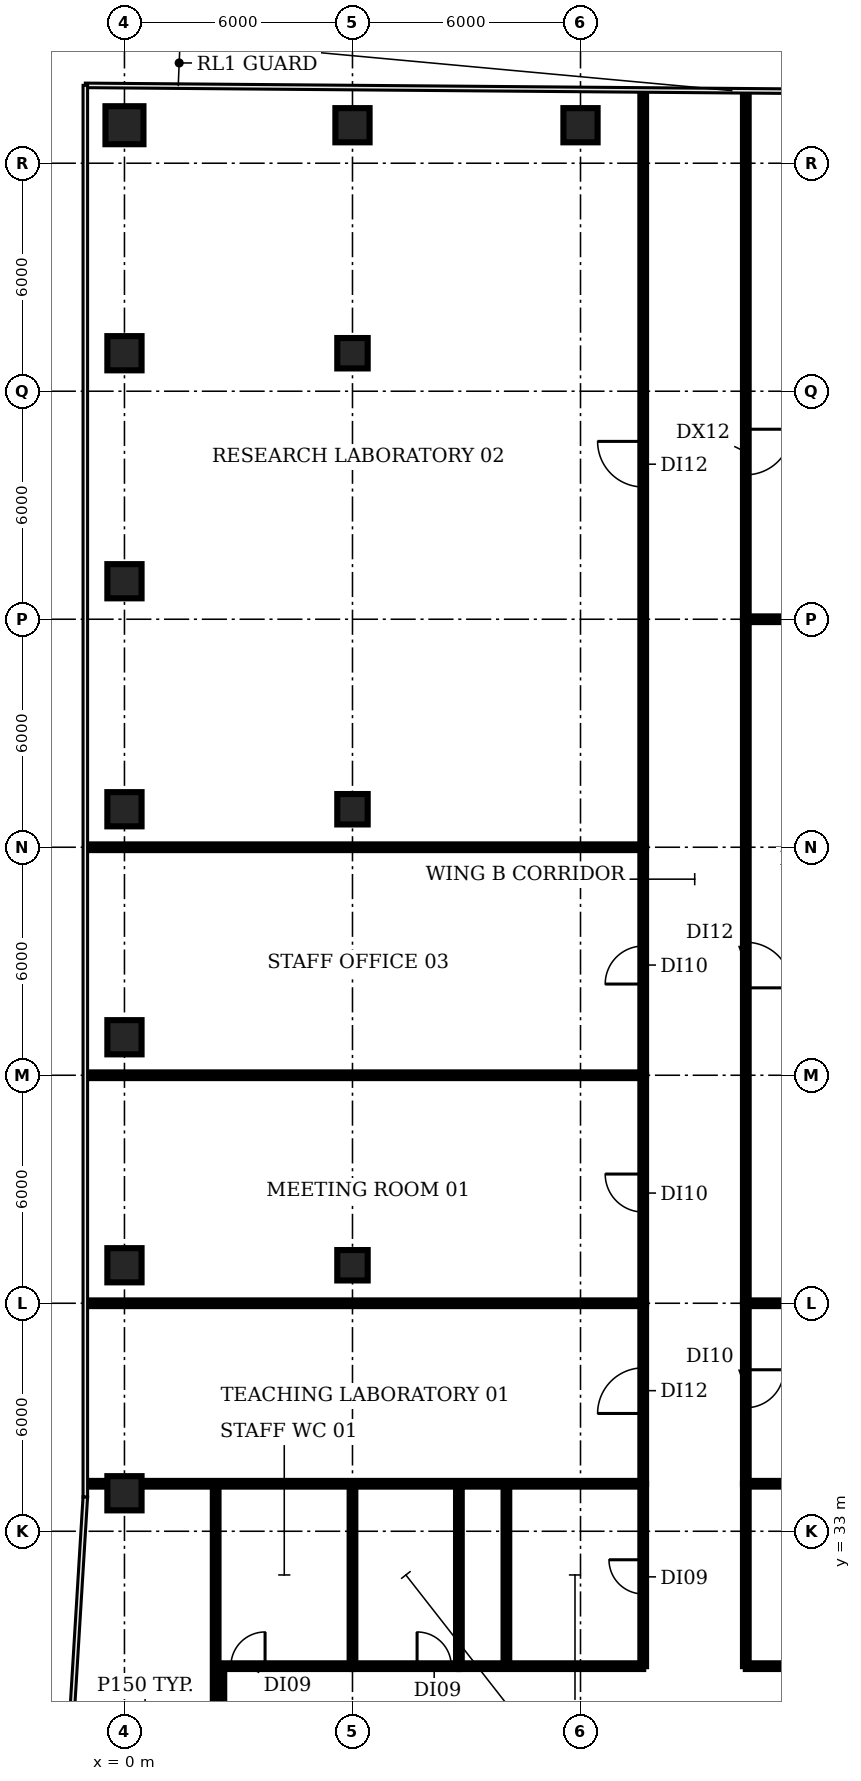
"""IFC4 building model, lengths in metres.
Left out: names, types, materials, properties, quantities, classifications, styles, units other than length and angle.
Written with IfcOpenShell. Run it as: python <this file> out.ifc"""

import sys

from ifc_helpers import new_model, si_unit, direction, frame, frame_2d, origin, origin_2d, place, context, subcontext, project, spatial, rectangle, circle, extrude, element, fill, save


model = new_model("IFC4")
c1 = context("Model", 3, precision=1e-05, world=origin(), true_north=direction((0.0, 1.0)))
c2 = subcontext(c1, "Body", "Model", "MODEL_VIEW")
j1 = project(units=[si_unit("LENGTHUNIT", "METRE"), si_unit("PLANEANGLEUNIT", "RADIAN")], contexts=[c1])
p1 = place(None, origin())
s1 = spatial("IfcSite", under=j1, at=p1, CompositionType="ELEMENT")
p2 = place(p1, origin())
s2 = spatial("IfcBuilding", under=s1, at=p2, CompositionType="ELEMENT")
p3 = place(p2, frame((0.0, 0.0, 125.6)))
s3 = spatial("IfcBuildingStorey", under=s2, at=p3, CompositionType="ELEMENT", Elevation=125.6)
for number, where, z_axis, x_axis in (
    (1, (0.0, 34.0, 0.0), (0.0, 0.0, 1.0), (1.0, 0.0, 0.0)),
    (2, (0.0, 40.0, 0.0), (0.0, 0.0, 1.0), (1.0, 0.0, 0.0)),
    (3, (0.0, 46.0, 0.0), (0.0, 0.0, 1.0), (1.0, 0.0, 0.0)),
    (4, (0.0, 52.0, 0.0), (0.0, 0.0, 1.0), (1.0, 0.0, 0.0)),
    (5, (0.0, 58.0, 0.0), (0.0, 0.0, 1.0), (1.0, 0.0, 0.0)),
    (6, (0.0, 64.0, 0.0), (0.0, 0.0, 1.0), (1.0, 0.0, 0.0)),
):
    element("IfcColumn", number, at=place(p3, frame(where, z_axis=z_axis, x_axis=x_axis)), inside=s3, PredefinedType="COLUMN", context=c2, shape_type="SweptSolid", body=[
        extrude(rectangle(XDim=0.9, YDim=0.9, at=origin_2d()), origin(), (0.0, 0.0, 1.0), 3.85),
    ])
p4 = place(p3, frame((0.0, 70.0, 0.0), z_axis=(0.0, 0.0, 1.0), x_axis=(1.0, 0.0, 0.0)))
e7 = element("IfcColumn", 7, at=p4, inside=s3, PredefinedType="COLUMN", context=c2, shape_type="SweptSolid", body=[
    extrude(circle(Radius=0.5, at=origin_2d()), origin(), (0.0, 0.0, 1.0), 3.85),
])
for number, where, z_axis, x_axis in (
    (8, (6.0, 40.0, 0.0), (0.0, 0.0, 1.0), (1.0, 0.0, 0.0)),
    (9, (6.0, 52.0, 0.0), (0.0, 0.0, 1.0), (1.0, 0.0, 0.0)),
    (10, (6.0, 64.0, 0.0), (0.0, 0.0, 1.0), (1.0, 0.0, 0.0)),
):
    element("IfcColumn", number, at=place(p3, frame(where, z_axis=z_axis, x_axis=x_axis)), inside=s3, PredefinedType="COLUMN", context=c2, shape_type="SweptSolid", body=[
        extrude(rectangle(XDim=0.8, YDim=0.8, at=origin_2d()), origin(), (0.0, 0.0, 1.0), 3.85),
    ])
for number, where, z_axis, x_axis in (
    (11, (6.0, 70.0, 0.0), (0.0, 0.0, 1.0), (1.0, 0.0, 0.0)),
    (12, (12.0, 70.0, 0.0), (0.0, 0.0, 1.0), (1.0, 0.0, 0.0)),
):
    element("IfcColumn", number, at=place(p3, frame(where, z_axis=z_axis, x_axis=x_axis)), inside=s3, PredefinedType="COLUMN", context=c2, shape_type="SweptSolid", body=[
        extrude(rectangle(XDim=0.9, YDim=0.9, at=origin_2d()), origin(), (0.0, 0.0, 1.0), 3.85),
    ])
for number, where, z_axis, x_axis in (
    (13, (-0.98, 34.25, 0.0), (0.0, 0.0, 1.0), (1.0, 0.0, 0.0)),
    (14, (-0.98, 39.0, 0.0), (0.0, 0.0, 1.0), (1.0, 0.0, 0.0)),
    (15, (-0.98, 45.0, 0.0), (0.0, 0.0, 1.0), (1.0, 0.0, 0.0)),
    (16, (-0.98, 51.0, 0.0), (0.0, 0.0, 1.0), (1.0, 0.0, 0.0)),
):
    element("IfcWall", number, at=place(p3, frame(where, z_axis=z_axis, x_axis=x_axis)), inside=s3, PredefinedType="PARTITIONING", context=c2, shape_type="SweptSolid", body=[
        extrude(rectangle(XDim=14.63, YDim=0.15, at=frame_2d((7.315, 0.0))), origin(), (0.0, 0.0, 1.0), 2.83),
    ])
p5 = place(p3, frame((2.4, 28.25, 0.0), z_axis=(0.0, 0.0, 1.0), x_axis=(0.0, 1.0, 0.0)))
e17 = element("IfcWall", 17, at=p5, inside=s3, PredefinedType="PARTITIONING", context=c2, shape_type="SweptSolid", body=[
    extrude(rectangle(XDim=6.0, YDim=0.15, at=frame_2d((3.0, 0.0))), origin(), (0.0, 0.0, 1.0), 2.83),
])
p6 = place(p3, frame((2.55, 25.55, 0.0), z_axis=(0.0, 0.0, 1.0), x_axis=(0.0, 1.0, 0.0)))
e18 = element("IfcWall", 18, at=p6, inside=s3, PredefinedType="PARTITIONING", context=c2, shape_type="SweptSolid", body=[
    extrude(rectangle(XDim=3.9, YDim=0.15, at=frame_2d((1.95, 0.0))), origin(), (0.0, 0.0, 1.0), 2.83),
])
p7 = place(p3, frame((2.55, 29.45, 0.0), z_axis=(0.0, 0.0, 1.0), x_axis=(1.0, 0.0, 0.0)))
e19 = element("IfcWall", 19, at=p7, inside=s3, PredefinedType="PARTITIONING", context=c2, shape_type="SweptSolid", body=[
    extrude(rectangle(XDim=3.45, YDim=0.15, at=frame_2d((1.725, 0.0))), origin(), (0.0, 0.0, 1.0), 2.83),
])
p8 = place(p7, frame((0.25, 0.0, 0.0)))
e20 = element("IfcOpeningElement", 20, at=p8, cuts=e19, PredefinedType="OPENING", context=c2, shape_type="SweptSolid", body=[
    extrude(rectangle(XDim=0.9, YDim=2.1, at=frame_2d((0.45, 1.05))), frame((0.0, 0.085, 0.0), z_axis=(0.0, -1.0, 0.0), x_axis=(1.0, 0.0, 0.0)), (0.0, 0.0, 1.0), 0.17),
])
p9 = place(p3, frame((6.0, 29.45, 0.0), z_axis=(0.0, 0.0, 1.0), x_axis=(0.0, 1.0, 0.0)))
e21 = element("IfcWall", 21, at=p9, inside=s3, PredefinedType="PARTITIONING", context=c2, shape_type="SweptSolid", body=[
    extrude(rectangle(XDim=4.8, YDim=0.15, at=frame_2d((2.4, 0.0))), origin(), (0.0, 0.0, 1.0), 2.83),
])
p10 = place(p3, frame((6.0, 29.45, 0.0), z_axis=(0.0, 0.0, 1.0), x_axis=(1.0, 0.0, 0.0)))
e22 = element("IfcWall", 22, at=p10, inside=s3, PredefinedType="PARTITIONING", context=c2, shape_type="SweptSolid", body=[
    extrude(rectangle(XDim=2.8, YDim=0.15, at=frame_2d((1.4, 0.0))), origin(), (0.0, 0.0, 1.0), 2.83),
])
p11 = place(p10, frame((1.7, 0.0, 0.0)))
e23 = element("IfcOpeningElement", 23, at=p11, cuts=e22, PredefinedType="OPENING", context=c2, shape_type="SweptSolid", body=[
    extrude(rectangle(XDim=0.9, YDim=2.1, at=frame_2d((0.45, 1.05))), frame((0.0, 0.085, 0.0), z_axis=(0.0, -1.0, 0.0), x_axis=(1.0, 0.0, 0.0)), (0.0, 0.0, 1.0), 0.17),
])
p12 = place(p3, frame((8.8, 29.45, 0.0), z_axis=(0.0, 0.0, 1.0), x_axis=(0.0, 1.0, 0.0)))
e24 = element("IfcWall", 24, at=p12, inside=s3, PredefinedType="PARTITIONING", context=c2, shape_type="SweptSolid", body=[
    extrude(rectangle(XDim=4.8, YDim=0.15, at=frame_2d((2.4, 0.0))), origin(), (0.0, 0.0, 1.0), 2.83),
])
p13 = place(p3, frame((8.8, 29.45, 0.0), z_axis=(0.0, 0.0, 1.0), x_axis=(1.0, 0.0, 0.0)))
e25 = element("IfcWall", 25, at=p13, inside=s3, PredefinedType="PARTITIONING", context=c2, shape_type="SweptSolid", body=[
    extrude(rectangle(XDim=4.85, YDim=0.15, at=frame_2d((2.425, 0.0))), origin(), (0.0, 0.0, 1.0), 2.83),
])
p14 = place(p3, frame((10.05, 29.45, 0.0), z_axis=(0.0, 0.0, 1.0), x_axis=(0.0, 1.0, 0.0)))
e26 = element("IfcWall", 26, at=p14, inside=s3, PredefinedType="PARTITIONING", context=c2, shape_type="SweptSolid", body=[
    extrude(rectangle(XDim=4.8, YDim=0.15, at=frame_2d((2.4, 0.0))), origin(), (0.0, 0.0, 1.0), 2.83),
])
p15 = place(p3, frame((13.65, 29.45, 0.0), z_axis=(0.0, 0.0, 1.0), x_axis=(0.0, 1.0, 0.0)))
e27 = element("IfcWall", 27, at=p15, inside=s3, PredefinedType="PARTITIONING", context=c2, shape_type="SweptSolid", body=[
    extrude(rectangle(XDim=4.8, YDim=0.15, at=frame_2d((2.4, 0.0))), origin(), (0.0, 0.0, 1.0), 2.83),
])
p16 = place(p15, frame((1.9, 0.0, 0.0)))
e28 = element("IfcOpeningElement", 28, at=p16, cuts=e27, PredefinedType="OPENING", context=c2, shape_type="SweptSolid", body=[
    extrude(rectangle(XDim=0.9, YDim=2.1, at=frame_2d((0.45, 1.05))), frame((0.0, 0.085, 0.0), z_axis=(0.0, -1.0, 0.0), x_axis=(1.0, 0.0, 0.0)), (0.0, 0.0, 1.0), 0.17),
])
p17 = place(p3, frame((13.65, 34.25, 0.0), z_axis=(0.0, 0.0, 1.0), x_axis=(0.0, 1.0, 0.0)))
e29 = element("IfcWall", 29, at=p17, inside=s3, PredefinedType="PARTITIONING", context=c2, shape_type="SweptSolid", body=[
    extrude(rectangle(XDim=4.75, YDim=0.15, at=frame_2d((2.375, 0.0))), origin(), (0.0, 0.0, 1.0), 2.83),
])
p18 = place(p17, frame((1.85, 0.0, 0.0)))
e30 = element("IfcOpeningElement", 30, at=p18, cuts=e29, PredefinedType="OPENING", context=c2, shape_type="SweptSolid", body=[
    extrude(rectangle(XDim=1.2, YDim=2.1, at=frame_2d((0.6, 1.05))), frame((0.0, 0.085, 0.0), z_axis=(0.0, -1.0, 0.0), x_axis=(1.0, 0.0, 0.0)), (0.0, 0.0, 1.0), 0.17),
])
p19 = place(p3, frame((13.65, 39.0, 0.0), z_axis=(0.0, 0.0, 1.0), x_axis=(0.0, 1.0, 0.0)))
e31 = element("IfcWall", 31, at=p19, inside=s3, PredefinedType="PARTITIONING", context=c2, shape_type="SweptSolid", body=[
    extrude(rectangle(XDim=6.0, YDim=0.15, at=frame_2d((3.0, 0.0))), origin(), (0.0, 0.0, 1.0), 2.83),
])
p20 = place(p19, frame((2.4, 0.0, 0.0)))
e32 = element("IfcOpeningElement", 32, at=p20, cuts=e31, PredefinedType="OPENING", context=c2, shape_type="SweptSolid", body=[
    extrude(rectangle(XDim=1.0, YDim=2.1, at=frame_2d((0.5, 1.05))), frame((0.0, 0.085, 0.0), z_axis=(0.0, -1.0, 0.0), x_axis=(1.0, 0.0, 0.0)), (0.0, 0.0, 1.0), 0.17),
])
p21 = place(p3, frame((13.65, 45.0, 0.0), z_axis=(0.0, 0.0, 1.0), x_axis=(0.0, 1.0, 0.0)))
e33 = element("IfcWall", 33, at=p21, inside=s3, PredefinedType="PARTITIONING", context=c2, shape_type="SweptSolid", body=[
    extrude(rectangle(XDim=6.0, YDim=0.15, at=frame_2d((3.0, 0.0))), origin(), (0.0, 0.0, 1.0), 2.83),
])
p22 = place(p21, frame((2.4, 0.0, 0.0)))
e34 = element("IfcOpeningElement", 34, at=p22, cuts=e33, PredefinedType="OPENING", context=c2, shape_type="SweptSolid", body=[
    extrude(rectangle(XDim=1.0, YDim=2.1, at=frame_2d((0.5, 1.05))), frame((0.0, 0.085, 0.0), z_axis=(0.0, -1.0, 0.0), x_axis=(1.0, 0.0, 0.0)), (0.0, 0.0, 1.0), 0.17),
])
p23 = place(p3, frame((13.65, 51.0, 0.0), z_axis=(0.0, 0.0, 1.0), x_axis=(0.0, 1.0, 0.0)))
e35 = element("IfcWall", 35, at=p23, inside=s3, PredefinedType="PARTITIONING", context=c2, shape_type="SweptSolid", body=[
    extrude(rectangle(XDim=19.88, YDim=0.15, at=frame_2d((9.94, 0.0))), origin(), (0.0, 0.0, 1.0), 2.83),
])
p24 = place(p23, frame((9.48, 0.0, 0.0)))
e36 = element("IfcOpeningElement", 36, at=p24, cuts=e35, PredefinedType="OPENING", context=c2, shape_type="SweptSolid", body=[
    extrude(rectangle(XDim=1.2, YDim=2.1, at=frame_2d((0.6, 1.05))), frame((0.0, 0.085, 0.0), z_axis=(0.0, -1.0, 0.0), x_axis=(1.0, 0.0, 0.0)), (0.0, 0.0, 1.0), 0.17),
])
p25 = place(p3, frame((16.35, 29.45, 0.0), z_axis=(0.0, 0.0, 1.0), x_axis=(0.0, 1.0, 0.0)))
e37 = element("IfcWall", 37, at=p25, inside=s3, PredefinedType="PARTITIONING", context=c2, shape_type="SweptSolid", body=[
    extrude(rectangle(XDim=4.8, YDim=0.15, at=frame_2d((2.4, 0.0))), origin(), (0.0, 0.0, 1.0), 2.83),
])
p26 = place(p3, frame((16.35, 29.45, 0.0), z_axis=(0.0, 0.0, 1.0), x_axis=(1.0, 0.0, 0.0)))
e38 = element("IfcWall", 38, at=p26, inside=s3, PredefinedType="PARTITIONING", context=c2, shape_type="SweptSolid", body=[
    extrude(rectangle(XDim=7.5, YDim=0.15, at=frame_2d((3.75, 0.0))), origin(), (0.0, 0.0, 1.0), 2.83),
])
p27 = place(p3, frame((16.35, 34.25, 0.0), z_axis=(0.0, 0.0, 1.0), x_axis=(1.0, 0.0, 0.0)))
e39 = element("IfcWall", 39, at=p27, inside=s3, PredefinedType="PARTITIONING", context=c2, shape_type="SweptSolid", body=[
    extrude(rectangle(XDim=8.693, YDim=0.15, at=frame_2d((4.346, 0.0))), origin(), (0.0, 0.0, 1.0), 2.83),
])
p28 = place(p3, frame((16.35, 39.0, 0.0), z_axis=(0.0, 0.0, 1.0), x_axis=(0.0, -1.0, 0.0)))
e40 = element("IfcWall", 40, at=p28, inside=s3, PredefinedType="PARTITIONING", context=c2, shape_type="SweptSolid", body=[
    extrude(rectangle(XDim=4.75, YDim=0.15, at=frame_2d((2.375, 0.0))), origin(), (0.0, 0.0, 1.0), 2.83),
])
p29 = place(p28, frame((1.75, 0.0, 0.0)))
e41 = element("IfcOpeningElement", 41, at=p29, cuts=e40, PredefinedType="OPENING", context=c2, shape_type="SweptSolid", body=[
    extrude(rectangle(XDim=1.0, YDim=2.1, at=frame_2d((0.5, 1.05))), frame((0.0, 0.085, 0.0), z_axis=(0.0, -1.0, 0.0), x_axis=(1.0, 0.0, 0.0)), (0.0, 0.0, 1.0), 0.17),
])
p30 = place(p3, frame((16.35, 39.0, 0.0), z_axis=(0.0, 0.0, 1.0), x_axis=(1.0, 0.0, 0.0)))
e42 = element("IfcWall", 42, at=p30, inside=s3, PredefinedType="PARTITIONING", context=c2, shape_type="SweptSolid", body=[
    extrude(rectangle(XDim=8.99, YDim=0.15, at=frame_2d((4.495, 0.0))), origin(), (0.0, 0.0, 1.0), 2.83),
])
p31 = place(p3, frame((16.35, 57.0, 0.0), z_axis=(0.0, 0.0, 1.0), x_axis=(0.0, -1.0, 0.0)))
e43 = element("IfcWall", 43, at=p31, inside=s3, PredefinedType="PARTITIONING", context=c2, shape_type="SweptSolid", body=[
    extrude(rectangle(XDim=18.0, YDim=0.15, at=frame_2d((9.0, 0.0))), origin(), (0.0, 0.0, 1.0), 2.83),
])
p32 = place(p31, frame((8.5, 0.0, 0.0)))
e44 = element("IfcOpeningElement", 44, at=p32, cuts=e43, PredefinedType="OPENING", context=c2, shape_type="SweptSolid", body=[
    extrude(rectangle(XDim=1.2, YDim=2.1, at=frame_2d((0.6, 1.05))), frame((0.0, 0.085, 0.0), z_axis=(0.0, -1.0, 0.0), x_axis=(1.0, 0.0, 0.0)), (0.0, 0.0, 1.0), 0.17),
])
p33 = place(p3, frame((16.35, 57.0, 0.0), z_axis=(0.0, 0.0, 1.0), x_axis=(1.0, 0.0, 0.0)))
e45 = element("IfcWall", 45, at=p33, inside=s3, PredefinedType="PARTITIONING", context=c2, shape_type="SweptSolid", body=[
    extrude(rectangle(XDim=10.09, YDim=0.15, at=frame_2d((5.045, 0.0))), origin(), (0.0, 0.0, 1.0), 2.83),
])
p34 = place(p3, frame((16.35, 70.86, 0.0), z_axis=(0.0, 0.0, 1.0), x_axis=(0.0, -1.0, 0.0)))
e46 = element("IfcWall", 46, at=p34, inside=s3, PredefinedType="PARTITIONING", context=c2, shape_type="SweptSolid", body=[
    extrude(rectangle(XDim=13.86, YDim=0.15, at=frame_2d((6.93, 0.0))), origin(), (0.0, 0.0, 1.0), 2.83),
])
p35 = place(p34, frame((8.86, 0.0, 0.0)))
e47 = element("IfcOpeningElement", 47, at=p35, cuts=e46, PredefinedType="OPENING", context=c2, shape_type="SweptSolid", body=[
    extrude(rectangle(XDim=1.2, YDim=2.1, at=frame_2d((0.6, 1.05))), frame((0.0, 0.085, 0.0), z_axis=(0.0, -1.0, 0.0), x_axis=(1.0, 0.0, 0.0)), (0.0, 0.0, 1.0), 0.17),
])
p36 = place(p8, origin())
e48 = element("IfcDoor", 48, at=p36, inside=s3, OperationType="SINGLE_SWING_RIGHT", PredefinedType="DOOR", context=c2, shape_type="SweptSolid", body=[
    extrude(rectangle(XDim=0.9, YDim=2.1, at=frame_2d((0.45, 1.05))), frame((0.0, 0.025, 0.0), z_axis=(0.0, -1.0, 0.0), x_axis=(1.0, 0.0, 0.0)), (0.0, 0.0, 1.0), 0.05),
])
fill(e20, e48)
p37 = place(p11, origin())
e49 = element("IfcDoor", 49, at=p37, inside=s3, OperationType="SINGLE_SWING_LEFT", PredefinedType="DOOR", context=c2, shape_type="SweptSolid", body=[
    extrude(rectangle(XDim=0.9, YDim=2.1, at=frame_2d((0.45, 1.05))), frame((0.0, 0.025, 0.0), z_axis=(0.0, -1.0, 0.0), x_axis=(1.0, 0.0, 0.0)), (0.0, 0.0, 1.0), 0.05),
])
fill(e23, e49)
p38 = place(p16, origin())
e50 = element("IfcDoor", 50, at=p38, inside=s3, OperationType="SINGLE_SWING_RIGHT", PredefinedType="DOOR", context=c2, shape_type="SweptSolid", body=[
    extrude(rectangle(XDim=0.9, YDim=2.1, at=frame_2d((0.45, 1.05))), frame((0.0, 0.025, 0.0), z_axis=(0.0, -1.0, 0.0), x_axis=(1.0, 0.0, 0.0)), (0.0, 0.0, 1.0), 0.05),
])
fill(e28, e50)
p39 = place(p18, origin())
e51 = element("IfcDoor", 51, at=p39, inside=s3, OperationType="SINGLE_SWING_LEFT", PredefinedType="DOOR", context=c2, shape_type="SweptSolid", body=[
    extrude(rectangle(XDim=1.2, YDim=2.1, at=frame_2d((0.6, 1.05))), frame((0.0, 0.025, 0.0), z_axis=(0.0, -1.0, 0.0), x_axis=(1.0, 0.0, 0.0)), (0.0, 0.0, 1.0), 0.05),
])
fill(e30, e51)
p40 = place(p20, origin())
e52 = element("IfcDoor", 52, at=p40, inside=s3, OperationType="SINGLE_SWING_RIGHT", PredefinedType="DOOR", context=c2, shape_type="SweptSolid", body=[
    extrude(rectangle(XDim=1.0, YDim=2.1, at=frame_2d((0.5, 1.05))), frame((0.0, 0.025, 0.0), z_axis=(0.0, -1.0, 0.0), x_axis=(1.0, 0.0, 0.0)), (0.0, 0.0, 1.0), 0.05),
])
fill(e32, e52)
p41 = place(p22, origin())
e53 = element("IfcDoor", 53, at=p41, inside=s3, OperationType="SINGLE_SWING_LEFT", PredefinedType="DOOR", context=c2, shape_type="SweptSolid", body=[
    extrude(rectangle(XDim=1.0, YDim=2.1, at=frame_2d((0.5, 1.05))), frame((0.0, 0.025, 0.0), z_axis=(0.0, -1.0, 0.0), x_axis=(1.0, 0.0, 0.0)), (0.0, 0.0, 1.0), 0.05),
])
fill(e34, e53)
p42 = place(p24, origin())
e54 = element("IfcDoor", 54, at=p42, inside=s3, OperationType="SINGLE_SWING_RIGHT", PredefinedType="DOOR", context=c2, shape_type="SweptSolid", body=[
    extrude(rectangle(XDim=1.2, YDim=2.1, at=frame_2d((0.6, 1.05))), frame((0.0, 0.025, 0.0), z_axis=(0.0, -1.0, 0.0), x_axis=(1.0, 0.0, 0.0)), (0.0, 0.0, 1.0), 0.05),
])
fill(e36, e54)
p43 = place(p29, origin())
e55 = element("IfcDoor", 55, at=p43, inside=s3, OperationType="SINGLE_SWING_LEFT", PredefinedType="DOOR", context=c2, shape_type="SweptSolid", body=[
    extrude(rectangle(XDim=1.0, YDim=2.1, at=frame_2d((0.5, 1.05))), frame((0.0, 0.025, 0.0), z_axis=(0.0, -1.0, 0.0), x_axis=(1.0, 0.0, 0.0)), (0.0, 0.0, 1.0), 0.05),
])
fill(e41, e55)
p44 = place(p32, origin())
e56 = element("IfcDoor", 56, at=p44, inside=s3, OperationType="SINGLE_SWING_RIGHT", PredefinedType="DOOR", context=c2, shape_type="SweptSolid", body=[
    extrude(rectangle(XDim=1.2, YDim=2.1, at=frame_2d((0.6, 1.05))), frame((0.0, 0.025, 0.0), z_axis=(0.0, -1.0, 0.0), x_axis=(1.0, 0.0, 0.0)), (0.0, 0.0, 1.0), 0.05),
])
fill(e44, e56)
p45 = place(p35, origin())
e57 = element("IfcDoor", 57, at=p45, inside=s3, OperationType="SINGLE_SWING_LEFT", PredefinedType="DOOR", context=c2, shape_type="SweptSolid", body=[
    extrude(rectangle(XDim=1.2, YDim=2.1, at=frame_2d((0.6, 1.05))), frame((0.0, 0.025, 0.0), z_axis=(0.0, -1.0, 0.0), x_axis=(1.0, 0.0, 0.0)), (0.0, 0.0, 1.0), 0.05),
])
fill(e47, e57)
save(model, sys.argv[1])
